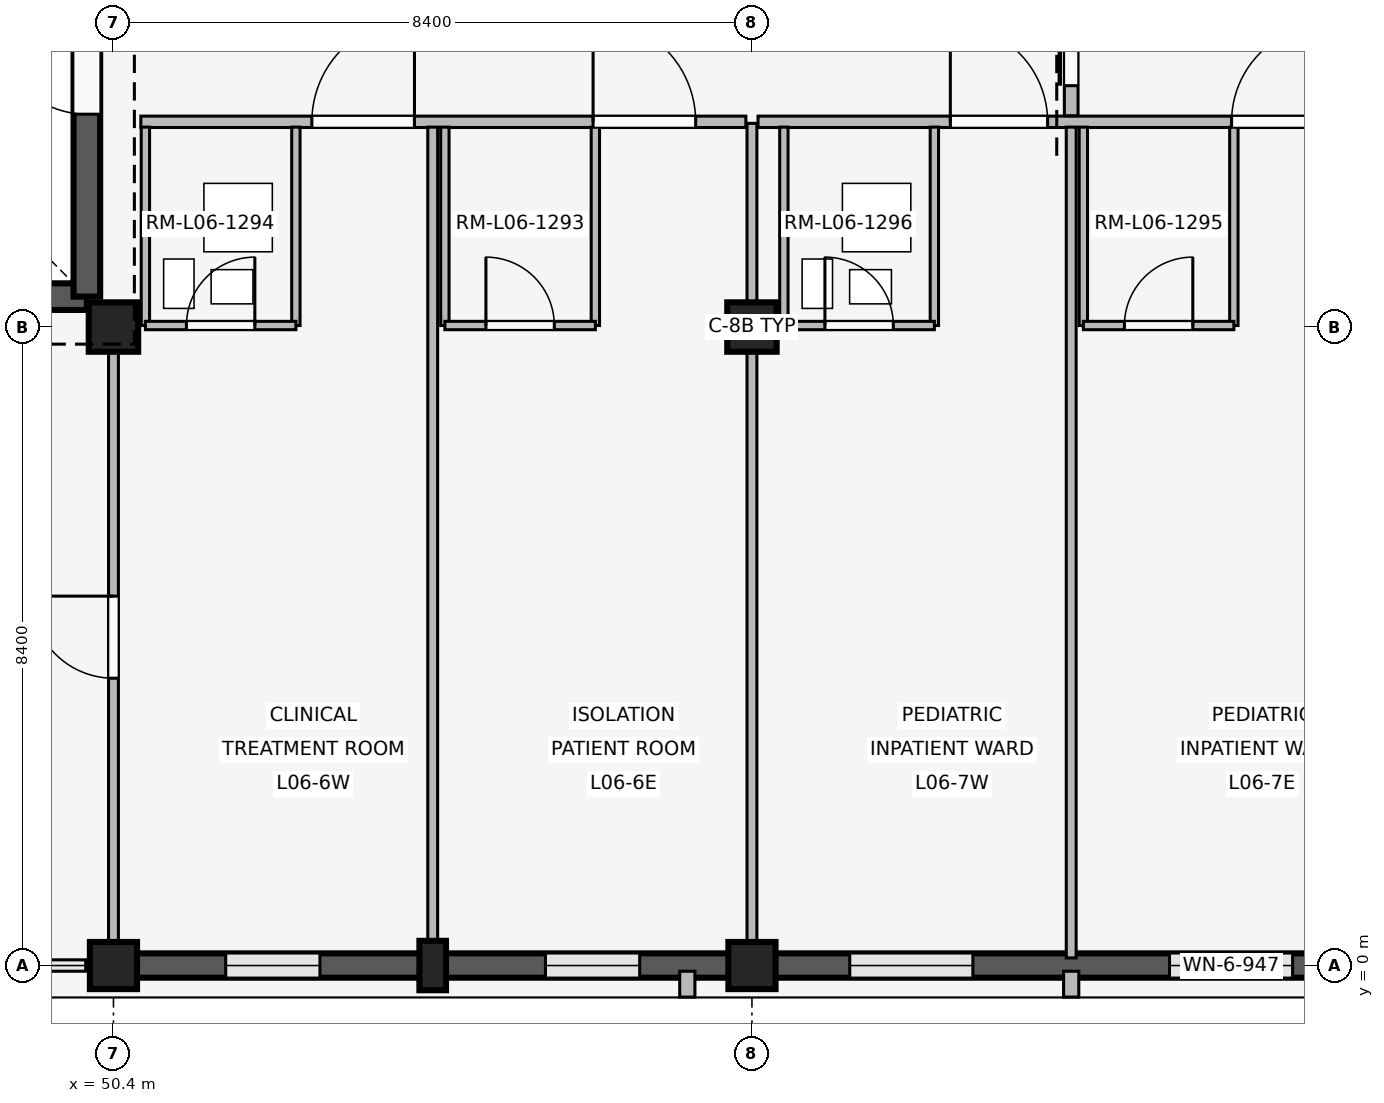
"""IFC4 building model, lengths in metres.
Left out: names, types, materials, properties, quantities, classifications, styles, units other than length and angle.
Written with IfcOpenShell. Run it as: python <this file> out.ifc"""

import sys

from ifc_helpers import new_model, si_unit, direction, frame, frame_2d, origin, origin_2d, place, context, subcontext, project, spatial, rectangle, extrude, element, fill, save


model = new_model("IFC4")
c1 = context("Model", 3, precision=1e-05, world=origin(), true_north=direction((0.0, 1.0)))
c2 = subcontext(c1, "Body", "Model", "MODEL_VIEW")
j1 = project(units=[si_unit("LENGTHUNIT", "METRE"), si_unit("PLANEANGLEUNIT", "RADIAN")], contexts=[c1])
p1 = place(None, origin())
s1 = spatial("IfcSite", under=j1, at=p1, CompositionType="ELEMENT")
p2 = place(p1, origin())
s2 = spatial("IfcBuilding", under=s1, at=p2, CompositionType="ELEMENT")
p3 = place(p2, frame((0.0, 0.0, 24.6)))
s3 = spatial("IfcBuildingStorey", under=s2, at=p3, CompositionType="ELEMENT", Elevation=24.6)
p4 = place(p3, frame((50.4, 0.0, 0.0), z_axis=(0.0, 0.0, 1.0), x_axis=(1.0, 0.0, 0.0)))
e1 = element("IfcColumn", 1, at=p4, inside=s3, PredefinedType="COLUMN", context=c2, shape_type="SweptSolid", body=[
    extrude(rectangle(XDim=0.62, YDim=0.62, at=origin_2d()), origin(), (0.0, 0.0, 1.0), 4.2),
])
p5 = place(p3, frame((50.4, 8.4, 0.0), z_axis=(0.0, 0.0, 1.0), x_axis=(1.0, 0.0, 0.0)))
e2 = element("IfcColumn", 2, at=p5, inside=s3, PredefinedType="COLUMN", context=c2, shape_type="SweptSolid", body=[
    extrude(rectangle(XDim=0.65, YDim=0.65, at=origin_2d()), origin(), (0.0, 0.0, 1.0), 4.2),
])
p6 = place(p3, frame((58.8, 0.0, 0.0), z_axis=(0.0, 0.0, 1.0), x_axis=(1.0, 0.0, 0.0)))
e3 = element("IfcColumn", 3, at=p6, inside=s3, PredefinedType="COLUMN", context=c2, shape_type="SweptSolid", body=[
    extrude(rectangle(XDim=0.62, YDim=0.62, at=origin_2d()), origin(), (0.0, 0.0, 1.0), 4.2),
])
p7 = place(p3, frame((58.8, 8.4, 0.0), z_axis=(0.0, 0.0, 1.0), x_axis=(1.0, 0.0, 0.0)))
e4 = element("IfcColumn", 4, at=p7, inside=s3, PredefinedType="COLUMN", context=c2, shape_type="SweptSolid", body=[
    extrude(rectangle(XDim=0.65, YDim=0.65, at=origin_2d()), origin(), (0.0, 0.0, 1.0), 4.2),
])
p8 = place(p3, frame((54.6, 0.0, 0.0), z_axis=(0.0, 0.0, 1.0), x_axis=(1.0, 0.0, 0.0)))
e5 = element("IfcColumn", 5, at=p8, inside=s3, PredefinedType="PILASTER", context=c2, shape_type="SweptSolid", body=[
    extrude(rectangle(XDim=0.35, YDim=0.65, at=origin_2d()), origin(), (0.0, 0.0, 1.0), 4.2),
])
p9 = place(p3, frame((58.495, 0.0, 0.0), z_axis=(0.0, 0.0, 1.0), x_axis=(-1.0, 0.0, 0.0)))
e6 = element("IfcWall", 6, at=p9, inside=s3, PredefinedType="SOLIDWALL", context=c2, shape_type="SweptSolid", body=[
    extrude(rectangle(XDim=7.79, YDim=0.32, at=frame_2d((3.895, 0.0))), origin(), (0.0, 0.0, 1.0), 3.34),
])
p10 = place(p9, frame((1.172, 0.0, 0.85)))
e7 = element("IfcOpeningElement", 7, at=p10, cuts=e6, PredefinedType="OPENING", context=c2, shape_type="SweptSolid", body=[
    extrude(rectangle(XDim=1.24, YDim=1.34, at=frame_2d((0.62, 0.67))), frame((0.0, 0.17, 0.0), z_axis=(0.0, -1.0, 0.0), x_axis=(1.0, 0.0, 0.0)), (0.0, 0.0, 1.0), 0.34),
])
p11 = place(p9, frame((5.378, 0.0, 0.85)))
e8 = element("IfcOpeningElement", 8, at=p11, cuts=e6, PredefinedType="OPENING", context=c2, shape_type="SweptSolid", body=[
    extrude(rectangle(XDim=1.24, YDim=1.34, at=frame_2d((0.62, 0.67))), frame((0.0, 0.17, 0.0), z_axis=(0.0, -1.0, 0.0), x_axis=(1.0, 0.0, 0.0)), (0.0, 0.0, 1.0), 0.34),
])
p12 = place(p3, frame((57.95, -0.075, 0.0), z_axis=(0.0, 0.0, 1.0), x_axis=(0.0, -1.0, 0.0)))
e9 = element("IfcWall", 9, at=p12, inside=s3, PredefinedType="ELEMENTEDWALL", context=c2, shape_type="SweptSolid", body=[
    extrude(rectangle(XDim=0.34, YDim=0.2, at=frame_2d((0.17, 0.0))), origin(), (0.0, 0.0, 1.0), 3.32),
])
p13 = place(p3, frame((66.895, 0.0, 0.0), z_axis=(0.0, 0.0, 1.0), x_axis=(-1.0, 0.0, 0.0)))
e10 = element("IfcWall", 10, at=p13, inside=s3, PredefinedType="SOLIDWALL", context=c2, shape_type="SweptSolid", body=[
    extrude(rectangle(XDim=7.79, YDim=0.32, at=frame_2d((3.895, 0.0))), origin(), (0.0, 0.0, 1.0), 3.34),
])
p14 = place(p13, frame((0.982, 0.0, 0.85)))
e11 = element("IfcOpeningElement", 11, at=p14, cuts=e10, PredefinedType="OPENING", context=c2, shape_type="SweptSolid", body=[
    extrude(rectangle(XDim=1.62, YDim=1.52, at=frame_2d((0.81, 0.76))), frame((0.0, 0.17, 0.0), z_axis=(0.0, -1.0, 0.0), x_axis=(1.0, 0.0, 0.0)), (0.0, 0.0, 1.0), 0.34),
])
p15 = place(p13, frame((5.188, 0.0, 0.85)))
e12 = element("IfcOpeningElement", 12, at=p15, cuts=e10, PredefinedType="OPENING", context=c2, shape_type="SweptSolid", body=[
    extrude(rectangle(XDim=1.62, YDim=1.52, at=frame_2d((0.81, 0.76))), frame((0.0, 0.17, 0.0), z_axis=(0.0, -1.0, 0.0), x_axis=(1.0, 0.0, 0.0)), (0.0, 0.0, 1.0), 0.34),
])
p16 = place(p3, frame((63.0, -0.075, 0.0), z_axis=(0.0, 0.0, 1.0), x_axis=(0.0, -1.0, 0.0)))
e13 = element("IfcWall", 13, at=p16, inside=s3, PredefinedType="ELEMENTEDWALL", context=c2, shape_type="SweptSolid", body=[
    extrude(rectangle(XDim=0.34, YDim=0.2, at=frame_2d((0.17, 0.0))), origin(), (0.0, 0.0, 1.0), 3.32),
])
p17 = place(p3, frame((42.55, 8.8, 0.0), z_axis=(0.0, 0.0, 1.0), x_axis=(1.0, 0.0, 0.0)))
e14 = element("IfcWall", 14, at=p17, inside=s3, PredefinedType="SHEAR", context=c2, shape_type="SweptSolid", body=[
    extrude(rectangle(XDim=7.5, YDim=0.35, at=frame_2d((3.75, 0.0))), origin(), (0.0, 0.0, 1.0), 3.92),
])
p18 = place(p17, frame((4.85, 0.0, 0.0)))
e15 = element("IfcOpeningElement", 15, at=p18, cuts=e14, PredefinedType="OPENING", context=c2, shape_type="SweptSolid", body=[
    extrude(rectangle(XDim=1.2, YDim=2.2, at=frame_2d((0.6, 1.1))), frame((0.0, 0.185, 0.0), z_axis=(0.0, -1.0, 0.0), x_axis=(1.0, 0.0, 0.0)), (0.0, 0.0, 1.0), 0.37),
])
p19 = place(p3, frame((50.05, 8.8, 0.0), z_axis=(0.0, 0.0, 1.0), x_axis=(0.0, 1.0, 0.0)))
e16 = element("IfcWall", 16, at=p19, inside=s3, PredefinedType="SHEAR", context=c2, shape_type="SweptSolid", body=[
    extrude(rectangle(XDim=7.55, YDim=0.35, at=frame_2d((3.775, 0.0))), origin(), (0.0, 0.0, 1.0), 3.92),
])
p20 = place(p19, frame((2.4, 0.0, 0.0)))
e17 = element("IfcOpeningElement", 17, at=p20, cuts=e16, PredefinedType="OPENING", context=c2, shape_type="SweptSolid", body=[
    extrude(rectangle(XDim=1.2, YDim=2.2, at=frame_2d((0.6, 1.1))), frame((0.0, 0.185, 0.0), z_axis=(0.0, -1.0, 0.0), x_axis=(1.0, 0.0, 0.0)), (0.0, 0.0, 1.0), 0.37),
])
p21 = place(p3, frame((50.4, 0.14, 0.0), z_axis=(0.0, 0.0, 1.0), x_axis=(0.0, 1.0, 0.0)))
e18 = element("IfcWall", 18, at=p21, inside=s3, PredefinedType="PARTITIONING", context=c2, shape_type="SweptSolid", body=[
    extrude(rectangle(XDim=8.21, YDim=0.13, at=frame_2d((4.105, 0.0))), origin(), (0.0, 0.0, 1.0), 3.32),
])
p22 = place(p21, frame((3.64, 0.0, 0.0)))
e19 = element("IfcOpeningElement", 19, at=p22, cuts=e18, PredefinedType="OPENING", context=c2, shape_type="SweptSolid", body=[
    extrude(rectangle(XDim=1.08, YDim=2.15, at=frame_2d((0.54, 1.075))), frame((0.0, 0.075, 0.0), z_axis=(0.0, -1.0, 0.0), x_axis=(1.0, 0.0, 0.0)), (0.0, 0.0, 1.0), 0.15),
])
p23 = place(p3, frame((50.76, 11.1, 0.0), z_axis=(0.0, 0.0, 1.0), x_axis=(1.0, 0.0, 0.0)))
e20 = element("IfcWall", 20, at=p23, inside=s3, PredefinedType="PARTITIONING", context=c2, shape_type="SweptSolid", body=[
    extrude(rectangle(XDim=7.96, YDim=0.15, at=frame_2d((3.98, 0.0))), origin(), (0.0, 0.0, 1.0), 3.32),
])
p24 = place(p23, frame((2.25, 0.0, 0.0)))
e21 = element("IfcOpeningElement", 21, at=p24, cuts=e20, PredefinedType="OPENING", context=c2, shape_type="SweptSolid", body=[
    extrude(rectangle(XDim=1.35, YDim=2.25, at=frame_2d((0.675, 1.125))), frame((0.0, 0.085, 0.0), z_axis=(0.0, -1.0, 0.0), x_axis=(1.0, 0.0, 0.0)), (0.0, 0.0, 1.0), 0.17),
])
p25 = place(p23, frame((5.95, 0.0, 0.0)))
e22 = element("IfcOpeningElement", 22, at=p25, cuts=e20, PredefinedType="OPENING", context=c2, shape_type="SweptSolid", body=[
    extrude(rectangle(XDim=1.35, YDim=2.25, at=frame_2d((0.675, 1.125))), frame((0.0, 0.085, 0.0), z_axis=(0.0, -1.0, 0.0), x_axis=(1.0, 0.0, 0.0)), (0.0, 0.0, 1.0), 0.17),
])
p26 = place(p3, frame((54.6, 0.1, 0.0), z_axis=(0.0, 0.0, 1.0), x_axis=(0.0, 1.0, 0.0)))
e23 = element("IfcWall", 23, at=p26, inside=s3, PredefinedType="PARTITIONING", context=c2, shape_type="SweptSolid", body=[
    extrude(rectangle(XDim=10.93, YDim=0.13, at=frame_2d((5.465, 0.0))), origin(), (0.0, 0.0, 1.0), 3.32),
])
for number, where, z_axis, x_axis in (
    (24, (50.82, 8.42, 0.0), (0.0, 0.0, 1.0), (0.0, 1.0, 0.0)),
    (25, (52.8, 8.42, 0.0), (0.0, 0.0, 1.0), (0.0, 1.0, 0.0)),
):
    element("IfcWall", number, at=place(p3, frame(where, z_axis=z_axis, x_axis=x_axis)), inside=s3, PredefinedType="PARTITIONING", context=c2, shape_type="SweptSolid", body=[
        extrude(rectangle(XDim=2.61, YDim=0.11, at=frame_2d((1.305, 0.0))), origin(), (0.0, 0.0, 1.0), 3.32),
    ])
p27 = place(p3, frame((50.82, 8.42, 0.0), z_axis=(0.0, 0.0, 1.0), x_axis=(1.0, 0.0, 0.0)))
e26 = element("IfcWall", 26, at=p27, inside=s3, PredefinedType="PARTITIONING", context=c2, shape_type="SweptSolid", body=[
    extrude(rectangle(XDim=1.98, YDim=0.11, at=frame_2d((0.99, 0.0))), origin(), (0.0, 0.0, 1.0), 3.32),
])
p28 = place(p27, frame((0.54, 0.0, 0.0)))
e27 = element("IfcOpeningElement", 27, at=p28, cuts=e26, PredefinedType="OPENING", context=c2, shape_type="SweptSolid", body=[
    extrude(rectangle(XDim=0.9, YDim=2.1, at=frame_2d((0.45, 1.05))), frame((0.0, 0.065, 0.0), z_axis=(0.0, -1.0, 0.0), x_axis=(1.0, 0.0, 0.0)), (0.0, 0.0, 1.0), 0.13),
])
for number, where, z_axis, x_axis in (
    (28, (54.76, 8.42, 0.0), (0.0, 0.0, 1.0), (0.0, 1.0, 0.0)),
    (29, (56.74, 8.42, 0.0), (0.0, 0.0, 1.0), (0.0, 1.0, 0.0)),
):
    element("IfcWall", number, at=place(p3, frame(where, z_axis=z_axis, x_axis=x_axis)), inside=s3, PredefinedType="PARTITIONING", context=c2, shape_type="SweptSolid", body=[
        extrude(rectangle(XDim=2.61, YDim=0.11, at=frame_2d((1.305, 0.0))), origin(), (0.0, 0.0, 1.0), 3.32),
    ])
p29 = place(p3, frame((54.76, 8.42, 0.0), z_axis=(0.0, 0.0, 1.0), x_axis=(1.0, 0.0, 0.0)))
e30 = element("IfcWall", 30, at=p29, inside=s3, PredefinedType="PARTITIONING", context=c2, shape_type="SweptSolid", body=[
    extrude(rectangle(XDim=1.98, YDim=0.11, at=frame_2d((0.99, 0.0))), origin(), (0.0, 0.0, 1.0), 3.32),
])
p30 = place(p29, frame((0.54, 0.0, 0.0)))
e31 = element("IfcOpeningElement", 31, at=p30, cuts=e30, PredefinedType="OPENING", context=c2, shape_type="SweptSolid", body=[
    extrude(rectangle(XDim=0.9, YDim=2.1, at=frame_2d((0.45, 1.05))), frame((0.0, 0.065, 0.0), z_axis=(0.0, -1.0, 0.0), x_axis=(1.0, 0.0, 0.0)), (0.0, 0.0, 1.0), 0.13),
])
p31 = place(p3, frame((58.8, 0.14, 0.0), z_axis=(0.0, 0.0, 1.0), x_axis=(0.0, 1.0, 0.0)))
e32 = element("IfcWall", 32, at=p31, inside=s3, PredefinedType="PARTITIONING", context=c2, shape_type="SweptSolid", body=[
    extrude(rectangle(XDim=10.94, YDim=0.13, at=frame_2d((5.47, 0.0))), origin(), (0.0, 0.0, 1.0), 3.32),
])
p32 = place(p3, frame((58.88, 11.1, 0.0), z_axis=(0.0, 0.0, 1.0), x_axis=(1.0, 0.0, 0.0)))
e33 = element("IfcWall", 33, at=p32, inside=s3, PredefinedType="PARTITIONING", context=c2, shape_type="SweptSolid", body=[
    extrude(rectangle(XDim=8.24, YDim=0.15, at=frame_2d((4.12, 0.0))), origin(), (0.0, 0.0, 1.0), 3.32),
])
p33 = place(p32, frame((2.53, 0.0, 0.0)))
e34 = element("IfcOpeningElement", 34, at=p33, cuts=e33, PredefinedType="OPENING", context=c2, shape_type="SweptSolid", body=[
    extrude(rectangle(XDim=1.28, YDim=2.2, at=frame_2d((0.64, 1.1))), frame((0.0, 0.085, 0.0), z_axis=(0.0, -1.0, 0.0), x_axis=(1.0, 0.0, 0.0)), (0.0, 0.0, 1.0), 0.17),
])
p34 = place(p32, frame((6.23, 0.0, 0.0)))
e35 = element("IfcOpeningElement", 35, at=p34, cuts=e33, PredefinedType="OPENING", context=c2, shape_type="SweptSolid", body=[
    extrude(rectangle(XDim=1.28, YDim=2.2, at=frame_2d((0.64, 1.1))), frame((0.0, 0.085, 0.0), z_axis=(0.0, -1.0, 0.0), x_axis=(1.0, 0.0, 0.0)), (0.0, 0.0, 1.0), 0.17),
])
p35 = place(p3, frame((63.0, 0.1, 0.0), z_axis=(0.0, 0.0, 1.0), x_axis=(0.0, 1.0, 0.0)))
e36 = element("IfcWall", 36, at=p35, inside=s3, PredefinedType="PARTITIONING", context=c2, shape_type="SweptSolid", body=[
    extrude(rectangle(XDim=10.93, YDim=0.13, at=frame_2d((5.465, 0.0))), origin(), (0.0, 0.0, 1.0), 3.32),
])
for number, where, z_axis, x_axis in (
    (37, (59.22, 8.42, 0.0), (0.0, 0.0, 1.0), (0.0, 1.0, 0.0)),
    (38, (61.2, 8.42, 0.0), (0.0, 0.0, 1.0), (0.0, 1.0, 0.0)),
):
    element("IfcWall", number, at=place(p3, frame(where, z_axis=z_axis, x_axis=x_axis)), inside=s3, PredefinedType="PARTITIONING", context=c2, shape_type="SweptSolid", body=[
        extrude(rectangle(XDim=2.61, YDim=0.11, at=frame_2d((1.305, 0.0))), origin(), (0.0, 0.0, 1.0), 3.32),
    ])
p36 = place(p3, frame((59.22, 8.42, 0.0), z_axis=(0.0, 0.0, 1.0), x_axis=(1.0, 0.0, 0.0)))
e39 = element("IfcWall", 39, at=p36, inside=s3, PredefinedType="PARTITIONING", context=c2, shape_type="SweptSolid", body=[
    extrude(rectangle(XDim=1.98, YDim=0.11, at=frame_2d((0.99, 0.0))), origin(), (0.0, 0.0, 1.0), 3.32),
])
p37 = place(p36, frame((0.54, 0.0, 0.0)))
e40 = element("IfcOpeningElement", 40, at=p37, cuts=e39, PredefinedType="OPENING", context=c2, shape_type="SweptSolid", body=[
    extrude(rectangle(XDim=0.9, YDim=2.1, at=frame_2d((0.45, 1.05))), frame((0.0, 0.065, 0.0), z_axis=(0.0, -1.0, 0.0), x_axis=(1.0, 0.0, 0.0)), (0.0, 0.0, 1.0), 0.13),
])
for number, where, z_axis, x_axis in (
    (41, (63.16, 8.42, 0.0), (0.0, 0.0, 1.0), (0.0, 1.0, 0.0)),
    (42, (65.14, 8.42, 0.0), (0.0, 0.0, 1.0), (0.0, 1.0, 0.0)),
):
    element("IfcWall", number, at=place(p3, frame(where, z_axis=z_axis, x_axis=x_axis)), inside=s3, PredefinedType="PARTITIONING", context=c2, shape_type="SweptSolid", body=[
        extrude(rectangle(XDim=2.61, YDim=0.11, at=frame_2d((1.305, 0.0))), origin(), (0.0, 0.0, 1.0), 3.32),
    ])
p38 = place(p3, frame((63.16, 8.42, 0.0), z_axis=(0.0, 0.0, 1.0), x_axis=(1.0, 0.0, 0.0)))
e43 = element("IfcWall", 43, at=p38, inside=s3, PredefinedType="PARTITIONING", context=c2, shape_type="SweptSolid", body=[
    extrude(rectangle(XDim=1.98, YDim=0.11, at=frame_2d((0.99, 0.0))), origin(), (0.0, 0.0, 1.0), 3.32),
])
p39 = place(p38, frame((0.54, 0.0, 0.0)))
e44 = element("IfcOpeningElement", 44, at=p39, cuts=e43, PredefinedType="OPENING", context=c2, shape_type="SweptSolid", body=[
    extrude(rectangle(XDim=0.9, YDim=2.1, at=frame_2d((0.45, 1.05))), frame((0.0, 0.065, 0.0), z_axis=(0.0, -1.0, 0.0), x_axis=(1.0, 0.0, 0.0)), (0.0, 0.0, 1.0), 0.13),
])
p40 = place(p3, frame((63.0, 11.18, 0.0), z_axis=(0.0, 0.0, 1.0), x_axis=(0.0, 1.0, 0.0)))
e45 = element("IfcWall", 45, at=p40, inside=s3, PredefinedType="PARTITIONING", context=c2, shape_type="SweptSolid", body=[
    extrude(rectangle(XDim=2.84, YDim=0.18, at=frame_2d((1.42, 0.0))), origin(), (0.0, 0.0, 1.0), 3.32),
])
p41 = place(p40, frame((0.395, 0.0, 0.0)))
e46 = element("IfcOpeningElement", 46, at=p41, cuts=e45, PredefinedType="OPENING", context=c2, shape_type="SweptSolid", body=[
    extrude(rectangle(XDim=2.05, YDim=2.35, at=frame_2d((1.025, 1.175))), frame((0.0, 0.1, 0.0), z_axis=(0.0, -1.0, 0.0), x_axis=(1.0, 0.0, 0.0)), (0.0, 0.0, 1.0), 0.2),
])
p42 = place(p10, origin())
e47 = element("IfcWindow", 47, at=p42, inside=s3, PartitioningType="SINGLE_PANEL", PredefinedType="WINDOW", context=c2, shape_type="SweptSolid", body=[
    extrude(rectangle(XDim=1.24, YDim=1.34, at=frame_2d((0.62, 0.67))), frame((0.0, 0.03, 0.0), z_axis=(0.0, -1.0, 0.0), x_axis=(1.0, 0.0, 0.0)), (0.0, 0.0, 1.0), 0.06),
])
fill(e7, e47)
p43 = place(p11, origin())
e48 = element("IfcWindow", 48, at=p43, inside=s3, PartitioningType="SINGLE_PANEL", PredefinedType="WINDOW", context=c2, shape_type="SweptSolid", body=[
    extrude(rectangle(XDim=1.24, YDim=1.34, at=frame_2d((0.62, 0.67))), frame((0.0, 0.03, 0.0), z_axis=(0.0, -1.0, 0.0), x_axis=(1.0, 0.0, 0.0)), (0.0, 0.0, 1.0), 0.06),
])
fill(e8, e48)
p44 = place(p14, origin())
e49 = element("IfcWindow", 49, at=p44, inside=s3, PartitioningType="SINGLE_PANEL", PredefinedType="WINDOW", context=c2, shape_type="SweptSolid", body=[
    extrude(rectangle(XDim=1.62, YDim=1.52, at=frame_2d((0.81, 0.76))), frame((0.0, 0.03, 0.0), z_axis=(0.0, -1.0, 0.0), x_axis=(1.0, 0.0, 0.0)), (0.0, 0.0, 1.0), 0.06),
])
fill(e11, e49)
p45 = place(p15, origin())
e50 = element("IfcWindow", 50, at=p45, inside=s3, PartitioningType="SINGLE_PANEL", PredefinedType="WINDOW", context=c2, shape_type="SweptSolid", body=[
    extrude(rectangle(XDim=1.62, YDim=1.52, at=frame_2d((0.81, 0.76))), frame((0.0, 0.03, 0.0), z_axis=(0.0, -1.0, 0.0), x_axis=(1.0, 0.0, 0.0)), (0.0, 0.0, 1.0), 0.06),
])
fill(e12, e50)
p46 = place(p20, origin())
e51 = element("IfcDoor", 51, at=p46, inside=s3, OperationType="SINGLE_SWING_RIGHT", PredefinedType="DOOR", context=c2, shape_type="SweptSolid", body=[
    extrude(rectangle(XDim=1.2, YDim=2.2, at=frame_2d((0.6, 1.1))), frame((0.0, 0.025, 0.0), z_axis=(0.0, -1.0, 0.0), x_axis=(1.0, 0.0, 0.0)), (0.0, 0.0, 1.0), 0.05),
])
fill(e17, e51)
p47 = place(p22, origin())
e52 = element("IfcDoor", 52, at=p47, inside=s3, OperationType="SINGLE_SWING_RIGHT", PredefinedType="DOOR", context=c2, shape_type="SweptSolid", body=[
    extrude(rectangle(XDim=1.08, YDim=2.15, at=frame_2d((0.54, 1.075))), frame((0.0, 0.025, 0.0), z_axis=(0.0, -1.0, 0.0), x_axis=(1.0, 0.0, 0.0)), (0.0, 0.0, 1.0), 0.05),
])
fill(e19, e52)
p48 = place(p24, origin())
e53 = element("IfcDoor", 53, at=p48, inside=s3, OperationType="SINGLE_SWING_RIGHT", PredefinedType="DOOR", context=c2, shape_type="SweptSolid", body=[
    extrude(rectangle(XDim=1.35, YDim=2.25, at=frame_2d((0.675, 1.125))), frame((0.0, 0.025, 0.0), z_axis=(0.0, -1.0, 0.0), x_axis=(1.0, 0.0, 0.0)), (0.0, 0.0, 1.0), 0.05),
])
fill(e21, e53)
p49 = place(p25, origin())
e54 = element("IfcDoor", 54, at=p49, inside=s3, OperationType="SINGLE_SWING_LEFT", PredefinedType="DOOR", context=c2, shape_type="SweptSolid", body=[
    extrude(rectangle(XDim=1.35, YDim=2.25, at=frame_2d((0.675, 1.125))), frame((0.0, 0.025, 0.0), z_axis=(0.0, -1.0, 0.0), x_axis=(1.0, 0.0, 0.0)), (0.0, 0.0, 1.0), 0.05),
])
fill(e22, e54)
p50 = place(p28, origin())
e55 = element("IfcDoor", 55, at=p50, inside=s3, OperationType="SINGLE_SWING_RIGHT", PredefinedType="DOOR", context=c2, shape_type="SweptSolid", body=[
    extrude(rectangle(XDim=0.9, YDim=2.1, at=frame_2d((0.45, 1.05))), frame((0.0, 0.025, 0.0), z_axis=(0.0, -1.0, 0.0), x_axis=(1.0, 0.0, 0.0)), (0.0, 0.0, 1.0), 0.05),
])
fill(e27, e55)
p51 = place(p30, origin())
e56 = element("IfcDoor", 56, at=p51, inside=s3, OperationType="SINGLE_SWING_LEFT", PredefinedType="DOOR", context=c2, shape_type="SweptSolid", body=[
    extrude(rectangle(XDim=0.9, YDim=2.1, at=frame_2d((0.45, 1.05))), frame((0.0, 0.025, 0.0), z_axis=(0.0, -1.0, 0.0), x_axis=(1.0, 0.0, 0.0)), (0.0, 0.0, 1.0), 0.05),
])
fill(e31, e56)
p52 = place(p33, origin())
e57 = element("IfcDoor", 57, at=p52, inside=s3, OperationType="SINGLE_SWING_LEFT", PredefinedType="DOOR", context=c2, shape_type="SweptSolid", body=[
    extrude(rectangle(XDim=1.28, YDim=2.2, at=frame_2d((0.64, 1.1))), frame((0.0, 0.025, 0.0), z_axis=(0.0, -1.0, 0.0), x_axis=(1.0, 0.0, 0.0)), (0.0, 0.0, 1.0), 0.05),
])
fill(e34, e57)
p53 = place(p34, origin())
e58 = element("IfcDoor", 58, at=p53, inside=s3, OperationType="SINGLE_SWING_RIGHT", PredefinedType="DOOR", context=c2, shape_type="SweptSolid", body=[
    extrude(rectangle(XDim=1.28, YDim=2.2, at=frame_2d((0.64, 1.1))), frame((0.0, 0.025, 0.0), z_axis=(0.0, -1.0, 0.0), x_axis=(1.0, 0.0, 0.0)), (0.0, 0.0, 1.0), 0.05),
])
fill(e35, e58)
p54 = place(p37, origin())
e59 = element("IfcDoor", 59, at=p54, inside=s3, OperationType="SINGLE_SWING_LEFT", PredefinedType="DOOR", context=c2, shape_type="SweptSolid", body=[
    extrude(rectangle(XDim=0.9, YDim=2.1, at=frame_2d((0.45, 1.05))), frame((0.0, 0.025, 0.0), z_axis=(0.0, -1.0, 0.0), x_axis=(1.0, 0.0, 0.0)), (0.0, 0.0, 1.0), 0.05),
])
fill(e40, e59)
p55 = place(p39, origin())
e60 = element("IfcDoor", 60, at=p55, inside=s3, OperationType="SINGLE_SWING_RIGHT", PredefinedType="DOOR", context=c2, shape_type="SweptSolid", body=[
    extrude(rectangle(XDim=0.9, YDim=2.1, at=frame_2d((0.45, 1.05))), frame((0.0, 0.025, 0.0), z_axis=(0.0, -1.0, 0.0), x_axis=(1.0, 0.0, 0.0)), (0.0, 0.0, 1.0), 0.05),
])
fill(e44, e60)
p56 = place(p41, origin())
e61 = element("IfcDoor", 61, at=p56, inside=s3, OperationType="SLIDING_TO_LEFT", PredefinedType="DOOR", context=c2, shape_type="SweptSolid", body=[
    extrude(rectangle(XDim=2.05, YDim=2.35, at=frame_2d((1.025, 1.175))), frame((0.0, 0.025, 0.0), z_axis=(0.0, -1.0, 0.0), x_axis=(1.0, 0.0, 0.0)), (0.0, 0.0, 1.0), 0.05),
])
fill(e46, e61)
save(model, sys.argv[1])
